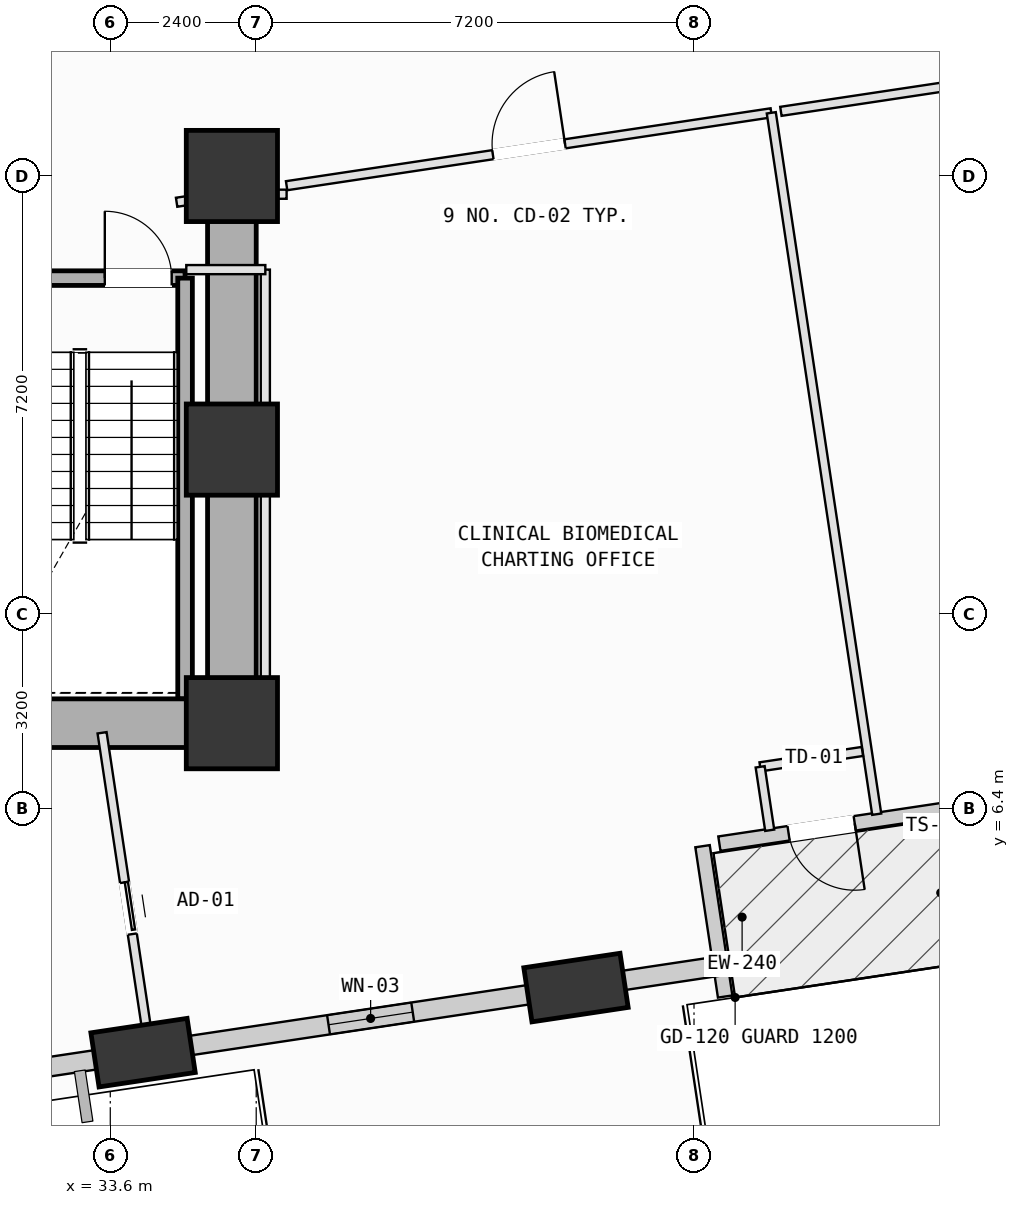
"""IFC4 building model, lengths in metres.
Left out: names, types, materials, properties, quantities, classifications, styles, units other than length and angle.
Written with IfcOpenShell. Run it as: python <this file> out.ifc"""

import sys

from ifc_helpers import new_model, si_unit, direction, frame, frame_2d, origin, origin_2d, place, context, subcontext, project, spatial, rectangle, extrude, element, fill, save


model = new_model("IFC4")
c1 = context("Model", 3, precision=1e-05, world=origin(), true_north=direction((0.0, 1.0)))
c2 = subcontext(c1, "Body", "Model", "MODEL_VIEW")
j1 = project(units=[si_unit("LENGTHUNIT", "METRE"), si_unit("PLANEANGLEUNIT", "RADIAN")], contexts=[c1])
p1 = place(None, origin())
s1 = spatial("IfcSite", under=j1, at=p1, CompositionType="ELEMENT")
p2 = place(p1, origin())
s2 = spatial("IfcBuilding", under=s1, at=p2, CompositionType="ELEMENT")
p3 = place(p2, frame((0.0, 0.0, 59.0)))
s3 = spatial("IfcBuildingStorey", under=s2, at=p3, CompositionType="ELEMENT", Elevation=59.0)
for number, where, z_axis, x_axis in (
    (1, (35.6, 7.8, 0.0), (0.0, 0.0, 1.0), (1.0, 0.0, 0.0)),
    (2, (35.6, 12.3, 0.0), (0.0, 0.0, 1.0), (1.0, 0.0, 0.0)),
    (3, (35.6, 16.8, 0.0), (0.0, 0.0, 1.0), (1.0, 0.0, 0.0)),
):
    element("IfcColumn", number, at=place(p3, frame(where, z_axis=z_axis, x_axis=x_axis)), inside=s3, PredefinedType="COLUMN", context=c2, shape_type="SweptSolid", body=[
        extrude(rectangle(XDim=1.5, YDim=1.5, at=origin_2d()), origin(), (0.0, 0.0, 1.0), 4.0),
    ])
p4 = place(p3, frame((34.139, 2.381, 0.002), z_axis=(0.092514972069, 0.002980429738, 0.995706832849), x_axis=(-0.179798499691, 0.983607197477, 0.01376156172)))
e4 = element("IfcColumn", 4, at=p4, inside=s3, PredefinedType="COLUMN", context=c2, shape_type="SweptSolid", body=[
    extrude(rectangle(XDim=1.6, YDim=0.9, at=origin_2d()), origin(), (0.0, 0.0, 1.0), 4.014),
])
p5 = place(p3, frame((41.259, 3.451, 0.002), z_axis=(0.087822940508, 0.032355820187, 0.995610482076), x_axis=(-0.480756753884, 0.876743589728, 0.013914793089)))
e5 = element("IfcColumn", 5, at=p5, inside=s3, PredefinedType="COLUMN", context=c2, shape_type="SweptSolid", body=[
    extrude(rectangle(XDim=1.6, YDim=0.9, at=origin_2d()), origin(), (0.0, 0.0, 1.0), 4.014),
])
p6 = place(p3, frame((50.5, 6.853, 0.0), z_axis=(0.0, 0.0, 1.0), x_axis=(-0.988888186317, -0.14866120867, 0.0)))
e6 = element("IfcWall", 6, at=p6, inside=s3, PredefinedType="SOLIDWALL", context=c2, shape_type="SweptSolid", body=[
    extrude(rectangle(XDim=6.96, YDim=0.24, at=frame_2d((3.48, 0.0))), origin(), (0.0, 0.0, 1.0), 3.165),
])
p7 = place(p6, frame((4.709, 0.0, 0.0)))
e7 = element("IfcOpeningElement", 7, at=p7, cuts=e6, PredefinedType="OPENING", context=c2, shape_type="SweptSolid", body=[
    extrude(rectangle(XDim=1.1, YDim=2.15, at=frame_2d((0.55, 1.075))), frame((0.0, 0.13, 0.0), z_axis=(0.0, -1.0, 0.0), x_axis=(1.0, 0.0, 0.0)), (0.0, 0.0, 1.0), 0.26),
])
p8 = place(p3, frame((43.341, 5.777, 0.0), z_axis=(0.0, 0.0, 1.0), x_axis=(0.148636526418, -0.988891896526, 0.0)))
e8 = element("IfcWall", 8, at=p8, inside=s3, PredefinedType="SOLIDWALL", context=c2, shape_type="SweptSolid", body=[
    extrude(rectangle(XDim=2.5, YDim=0.24, at=frame_2d((1.25, 0.0))), origin(), (0.0, 0.0, 1.0), 3.165),
])
p9 = place(p3, frame((33.721, 2.318, 0.0), z_axis=(0.0, 0.0, 1.0), x_axis=(-0.988883371434, -0.148693233543, 0.0)))
e9 = element("IfcWall", 9, at=p9, inside=s3, PredefinedType="SOLIDWALL", context=c2, shape_type="SweptSolid", body=[
    extrude(rectangle(XDim=5.99, YDim=0.32, at=frame_2d((2.995, 0.0))), origin(), (0.0, 0.0, 1.0), 3.165),
])
p10 = place(p9, frame((1.994, 0.0, 0.75)))
e10 = element("IfcOpeningElement", 10, at=p10, cuts=e9, PredefinedType="OPENING", context=c2, shape_type="SweptSolid", body=[
    extrude(rectangle(XDim=2.0, YDim=1.95, at=frame_2d((1.0, 0.975))), frame((0.0, 0.17, 0.0), z_axis=(0.0, -1.0, 0.0), x_axis=(1.0, 0.0, 0.0)), (0.0, 0.0, 1.0), 0.34),
])
p11 = place(p3, frame((40.841, 3.389, 0.0), z_axis=(0.0, 0.0, 1.0), x_axis=(-0.988886033007, -0.148675531691, 0.0)))
e11 = element("IfcWall", 11, at=p11, inside=s3, PredefinedType="SOLIDWALL", context=c2, shape_type="SweptSolid", body=[
    extrude(rectangle(XDim=5.985, YDim=0.32, at=frame_2d((2.993, 0.0))), origin(), (0.0, 0.0, 1.0), 3.165),
])
p12 = place(p11, frame((2.293, 0.0, 0.75)))
e12 = element("IfcOpeningElement", 12, at=p12, cuts=e11, PredefinedType="OPENING", context=c2, shape_type="SweptSolid", body=[
    extrude(rectangle(XDim=1.4, YDim=1.85, at=frame_2d((0.7, 0.925))), frame((0.0, 0.17, 0.0), z_axis=(0.0, -1.0, 0.0), x_axis=(1.0, 0.0, 0.0)), (0.0, 0.0, 1.0), 0.34),
])
p13 = place(p3, frame((43.617, 3.806, 0.0), z_axis=(0.0, 0.0, 1.0), x_axis=(-0.98889360458, -0.148625162139, 0.0)))
e13 = element("IfcWall", 13, at=p13, inside=s3, PredefinedType="SOLIDWALL", context=c2, shape_type="SweptSolid", body=[
    extrude(rectangle(XDim=1.593, YDim=0.32, at=frame_2d((0.797, 0.0))), origin(), (0.0, 0.0, 1.0), 3.145),
])
p14 = place(p3, frame((31.37, 15.12, 0.0), z_axis=(0.0, 0.0, 1.0), x_axis=(1.0, 0.0, 0.0)))
e14 = element("IfcWall", 14, at=p14, inside=s3, PredefinedType="SOLIDWALL", context=c2, shape_type="SweptSolid", body=[
    extrude(rectangle(XDim=3.46, YDim=0.24, at=frame_2d((1.73, 0.0))), origin(), (0.0, 0.0, 1.0), 3.78),
])
p15 = place(p14, frame((2.14, 0.0, 0.0)))
e15 = element("IfcOpeningElement", 15, at=p15, cuts=e14, PredefinedType="OPENING", context=c2, shape_type="SweptSolid", body=[
    extrude(rectangle(XDim=1.1, YDim=2.15, at=frame_2d((0.55, 1.075))), frame((0.0, 0.13, 0.0), z_axis=(0.0, -1.0, 0.0), x_axis=(1.0, 0.0, 0.0)), (0.0, 0.0, 1.0), 0.26),
])
p16 = place(p3, frame((34.83, 15.12, 0.0), z_axis=(0.0, 0.0, 1.0), x_axis=(0.0, -1.0, 0.0)))
e16 = element("IfcWall", 16, at=p16, inside=s3, PredefinedType="SOLIDWALL", context=c2, shape_type="SweptSolid", body=[
    extrude(rectangle(XDim=6.92, YDim=0.24, at=frame_2d((3.46, 0.0))), origin(), (0.0, 0.0, 1.0), 3.78),
])
p17 = place(p3, frame((24.8, 7.8, 0.0), z_axis=(0.0, 0.0, 1.0), x_axis=(1.0, 0.0, 0.0)))
e17 = element("IfcWall", 17, at=p17, inside=s3, PredefinedType="SHEAR", context=c2, shape_type="SweptSolid", body=[
    extrude(rectangle(XDim=10.8, YDim=0.8, at=frame_2d((5.4, 0.0))), origin(), (0.0, 0.0, 1.0), 3.78),
])
p18 = place(p3, frame((35.6, 7.8, 0.0), z_axis=(0.0, 0.0, 1.0), x_axis=(0.0, 1.0, 0.0)))
e18 = element("IfcWall", 18, at=p18, inside=s3, PredefinedType="SHEAR", context=c2, shape_type="SweptSolid", body=[
    extrude(rectangle(XDim=9.0, YDim=0.8, at=frame_2d((4.5, 0.0))), origin(), (0.0, 0.0, 1.0), 3.78),
])
p19 = place(p3, frame((34.287, 2.171, 0.0), z_axis=(0.0, 0.0, 1.0), x_axis=(-0.988936352868, -0.14834045293, 0.0)))
e19 = element("IfcWall", 19, at=p19, inside=s3, PredefinedType="PARTITIONING", context=c2, shape_type="SweptSolid", body=[
    extrude(rectangle(XDim=0.538, YDim=0.15, at=frame_2d((0.269, 0.0))), origin(), (0.0, 0.0, 1.0), 3.165),
])
p20 = place(p3, frame((33.465, 7.642, 0.0), z_axis=(0.0, 0.0, 1.0), x_axis=(0.14857781012, -0.988900720164, 0.0)))
e20 = element("IfcWall", 20, at=p20, inside=s3, PredefinedType="PARTITIONING", context=c2, shape_type="SweptSolid", body=[
    extrude(rectangle(XDim=5.533, YDim=0.15, at=frame_2d((2.766, 0.0))), origin(), (0.0, 0.0, 1.0), 3.78),
])
p21 = place(p20, frame((2.488, 0.0, 0.0)))
e21 = element("IfcOpeningElement", 21, at=p21, cuts=e20, PredefinedType="OPENING", context=c2, shape_type="SweptSolid", body=[
    extrude(rectangle(XDim=0.86, YDim=2.06, at=frame_2d((0.43, 1.03))), frame((0.0, 0.085, 0.0), z_axis=(0.0, -1.0, 0.0), x_axis=(1.0, 0.0, 0.0)), (0.0, 0.0, 1.0), 0.17),
])
p22 = place(p3, frame((35.6, 7.5, 0.0), z_axis=(0.0, 0.0, 1.0), x_axis=(1.0, 0.0, 0.0)))
e22 = element("IfcWall", 22, at=p22, inside=s3, PredefinedType="PARTITIONING", context=c2, shape_type="SweptSolid", body=[
    extrude(rectangle(XDim=0.55, YDim=0.15, at=frame_2d((0.275, 0.0))), origin(), (0.0, 0.0, 1.0), 3.445),
])
p23 = place(p3, frame((36.15, 7.5, 0.0), z_axis=(0.0, 0.0, 1.0), x_axis=(0.0, 1.0, 0.0)))
e23 = element("IfcWall", 23, at=p23, inside=s3, PredefinedType="PARTITIONING", context=c2, shape_type="SweptSolid", body=[
    extrude(rectangle(XDim=7.76, YDim=0.15, at=frame_2d((3.88, 0.0))), origin(), (0.0, 0.0, 1.0), 3.78),
])
p24 = place(p3, frame((36.15, 15.26, 0.0), z_axis=(0.0, 0.0, 1.0), x_axis=(-1.0, 0.0, 0.0)))
e24 = element("IfcWall", 24, at=p24, inside=s3, PredefinedType="PARTITIONING", context=c2, shape_type="SweptSolid", body=[
    extrude(rectangle(XDim=1.3, YDim=0.15, at=frame_2d((0.65, 0.0))), origin(), (0.0, 0.0, 1.0), 3.78),
])
p25 = place(p3, frame((34.691, 16.368, 0.0), z_axis=(0.0, 0.0, 1.0), x_axis=(0.988798318439, 0.149257781885, 0.0)))
e25 = element("IfcWall", 25, at=p25, inside=s3, PredefinedType="PARTITIONING", context=c2, shape_type="SweptSolid", body=[
    extrude(rectangle(XDim=0.885, YDim=0.15, at=frame_2d((0.442, 0.0))), origin(), (0.0, 0.0, 1.0), 2.865),
])
p26 = place(p3, frame((35.566, 16.5, 0.0), z_axis=(0.0, 0.0, 1.0), x_axis=(1.0, 0.0, 0.0)))
e26 = element("IfcWall", 26, at=p26, inside=s3, PredefinedType="PARTITIONING", context=c2, shape_type="SweptSolid", body=[
    extrude(rectangle(XDim=0.934, YDim=0.15, at=frame_2d((0.467, 0.0))), origin(), (0.0, 0.0, 1.0), 2.865),
])
p27 = place(p3, frame((36.5, 16.64, 0.0), z_axis=(0.0, 0.0, 1.0), x_axis=(0.988871164491, 0.148774393089, 0.0)))
e27 = element("IfcWall", 27, at=p27, inside=s3, PredefinedType="PARTITIONING", context=c2, shape_type="SweptSolid", body=[
    extrude(rectangle(XDim=8.061, YDim=0.15, at=frame_2d((4.03, 0.0))), origin(), (0.0, 0.0, 1.0), 3.78),
])
p28 = place(p27, frame((3.43, 0.0, 0.0)))
e28 = element("IfcOpeningElement", 28, at=p28, cuts=e27, PredefinedType="OPENING", context=c2, shape_type="SweptSolid", body=[
    extrude(rectangle(XDim=1.2, YDim=2.15, at=frame_2d((0.6, 1.075))), frame((0.0, 0.085, 0.0), z_axis=(0.0, -1.0, 0.0), x_axis=(1.0, 0.0, 0.0)), (0.0, 0.0, 1.0), 0.17),
])
p29 = place(p3, frame((44.471, 17.839, 0.0), z_axis=(0.0, 0.0, 1.0), x_axis=(0.148651551243, -0.988889638086, 0.0)))
e29 = element("IfcWall", 29, at=p29, inside=s3, PredefinedType="PARTITIONING", context=c2, shape_type="SweptSolid", body=[
    extrude(rectangle(XDim=11.666, YDim=0.15, at=frame_2d((5.833, 0.0))), origin(), (0.0, 0.0, 1.0), 3.78),
])
p30 = place(p3, frame((45.969, 7.335, 0.0), z_axis=(0.0, 0.0, 1.0), x_axis=(-0.988867770365, -0.148796951358, 0.0)))
e30 = element("IfcWall", 30, at=p30, inside=s3, PredefinedType="PARTITIONING", context=c2, shape_type="SweptSolid", body=[
    extrude(rectangle(XDim=1.7, YDim=0.15, at=frame_2d((0.85, 0.0))), origin(), (0.0, 0.0, 1.0), 3.78),
])
p31 = place(p3, frame((44.288, 7.082, 0.0), z_axis=(0.0, 0.0, 1.0), x_axis=(0.148838473401, -0.988861521567, 0.0)))
e31 = element("IfcWall", 31, at=p31, inside=s3, PredefinedType="PARTITIONING", context=c2, shape_type="SweptSolid", body=[
    extrude(rectangle(XDim=1.055, YDim=0.15, at=frame_2d((0.527, 0.0))), origin(), (0.0, 0.0, 1.0), 3.78),
])
p32 = place(p3, frame((42.075, 3.341, 0.0), z_axis=(0.0, 0.0, 1.0), x_axis=(-0.988914204574, -0.148488033159, 0.0)))
e32 = element("IfcWall", 32, at=p32, inside=s3, PredefinedType="PARTITIONING", context=c2, shape_type="SweptSolid", body=[
    extrude(rectangle(XDim=1.213, YDim=0.15, at=frame_2d((0.607, 0.0))), origin(), (0.0, 0.0, 1.0), 3.145),
])
p33 = place(p3, frame((34.957, 2.271, 0.0), z_axis=(0.0, 0.0, 1.0), x_axis=(-0.988905199831, -0.148547991391, 0.0)))
e33 = element("IfcWall", 33, at=p33, inside=s3, PredefinedType="PARTITIONING", context=c2, shape_type="SweptSolid", body=[
    extrude(rectangle(XDim=0.518, YDim=0.15, at=frame_2d((0.259, 0.0))), origin(), (0.0, 0.0, 1.0), 3.165),
])
p34 = place(p3, frame((44.629, 17.863, 0.0), z_axis=(0.0, 0.0, 1.0), x_axis=(0.988897401615, 0.148599895962, 0.0)))
e34 = element("IfcWall", 34, at=p34, inside=s3, PredefinedType="PARTITIONING", context=c2, shape_type="SweptSolid", body=[
    extrude(rectangle(XDim=12.24, YDim=0.15, at=frame_2d((6.12, 0.0))), origin(), (0.0, 0.0, 1.0), 3.78),
])
p35 = place(p34, frame((5.52, 0.0, 0.0)))
e35 = element("IfcOpeningElement", 35, at=p35, cuts=e34, PredefinedType="OPENING", context=c2, shape_type="SweptSolid", body=[
    extrude(rectangle(XDim=1.2, YDim=2.15, at=frame_2d((0.6, 1.075))), frame((0.0, 0.085, 0.0), z_axis=(0.0, -1.0, 0.0), x_axis=(1.0, 0.0, 0.0)), (0.0, 0.0, 1.0), 0.17),
])
p36 = place(p7, origin())
e36 = element("IfcDoor", 36, at=p36, inside=s3, OperationType="SINGLE_SWING_LEFT", PredefinedType="DOOR", context=c2, shape_type="SweptSolid", body=[
    extrude(rectangle(XDim=1.1, YDim=2.15, at=frame_2d((0.55, 1.075))), frame((0.0, 0.025, 0.0), z_axis=(0.0, -1.0, 0.0), x_axis=(1.0, 0.0, 0.0)), (0.0, 0.0, 1.0), 0.05),
])
fill(e7, e36)
p37 = place(p12, origin())
e37 = element("IfcWindow", 37, at=p37, inside=s3, PartitioningType="SINGLE_PANEL", PredefinedType="WINDOW", context=c2, shape_type="SweptSolid", body=[
    extrude(rectangle(XDim=1.4, YDim=1.85, at=frame_2d((0.7, 0.925))), frame((0.0, 0.03, 0.0), z_axis=(0.0, -1.0, 0.0), x_axis=(1.0, 0.0, 0.0)), (0.0, 0.0, 1.0), 0.06),
])
fill(e12, e37)
p38 = place(p15, origin())
e38 = element("IfcDoor", 38, at=p38, inside=s3, OperationType="SINGLE_SWING_LEFT", PredefinedType="DOOR", context=c2, shape_type="SweptSolid", body=[
    extrude(rectangle(XDim=1.1, YDim=2.15, at=frame_2d((0.55, 1.075))), frame((0.0, 0.025, 0.0), z_axis=(0.0, -1.0, 0.0), x_axis=(1.0, 0.0, 0.0)), (0.0, 0.0, 1.0), 0.05),
])
fill(e15, e38)
p39 = place(p28, origin())
e39 = element("IfcDoor", 39, at=p39, inside=s3, OperationType="SINGLE_SWING_RIGHT", PredefinedType="DOOR", context=c2, shape_type="SweptSolid", body=[
    extrude(rectangle(XDim=1.2, YDim=2.15, at=frame_2d((0.6, 1.075))), frame((0.0, 0.025, 0.0), z_axis=(0.0, -1.0, 0.0), x_axis=(1.0, 0.0, 0.0)), (0.0, 0.0, 1.0), 0.05),
])
fill(e28, e39)
p40 = place(p21, origin())
e40 = element("IfcDoor", 40, at=p40, inside=s3, OperationType="SLIDING_TO_LEFT", PredefinedType="DOOR", context=c2, shape_type="SweptSolid", body=[
    extrude(rectangle(XDim=0.86, YDim=2.06, at=frame_2d((0.43, 1.03))), frame((0.0, 0.025, 0.0), z_axis=(0.0, -1.0, 0.0), x_axis=(1.0, 0.0, 0.0)), (0.0, 0.0, 1.0), 0.05),
])
fill(e21, e40)
save(model, sys.argv[1])
